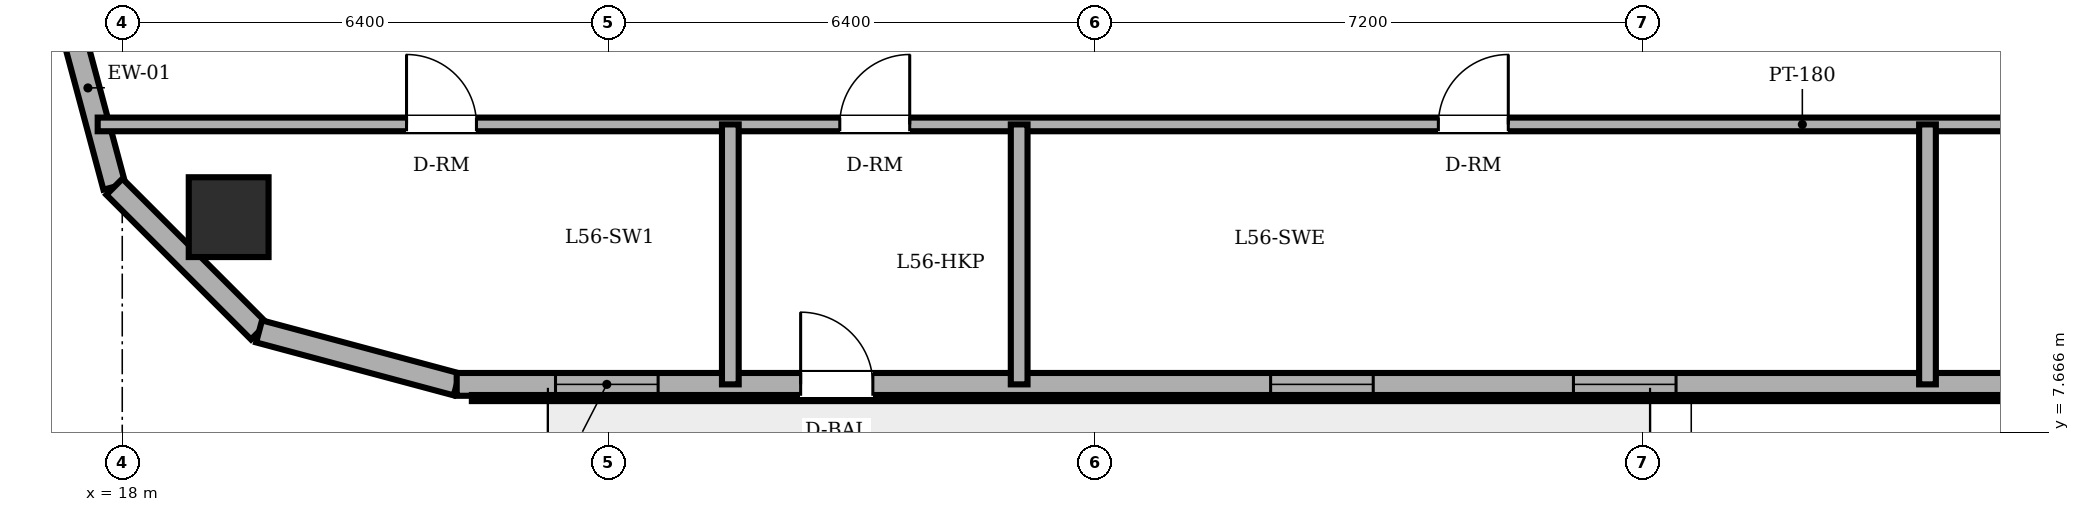
"""IFC4 building model, lengths in metres.
Left out: names, types, materials, properties, quantities, classifications, styles, units other than length and angle.
Written with IfcOpenShell. Run it as: python <this file> out.ifc"""

import sys

from ifc_helpers import new_model, si_unit, direction, frame, frame_2d, origin, origin_2d, place, context, subcontext, project, spatial, rectangle, circle, extrude, element, fill, save


model = new_model("IFC4")
c1 = context("Model", 3, precision=1e-05, world=origin(), true_north=direction((0.0, 1.0)))
c2 = subcontext(c1, "Body", "Model", "MODEL_VIEW")
j1 = project(units=[si_unit("LENGTHUNIT", "METRE"), si_unit("PLANEANGLEUNIT", "RADIAN")], contexts=[c1])
p1 = place(None, origin())
s1 = spatial("IfcSite", under=j1, at=p1, CompositionType="ELEMENT")
p2 = place(p1, origin())
s2 = spatial("IfcBuilding", under=s1, at=p2, CompositionType="ELEMENT")
p3 = place(p2, frame((0.0, 0.0, 215.7)))
s3 = spatial("IfcBuildingStorey", under=s2, at=p3, CompositionType="ELEMENT", Elevation=215.7)
p4 = place(p3, frame((19.4, 10.5, 0.0), z_axis=(0.0, 0.0, 1.0), x_axis=(1.0, 0.0, 0.0)))
e1 = element("IfcColumn", 1, at=p4, inside=s3, PredefinedType="COLUMN", context=c2, shape_type="SweptSolid", body=[
    extrude(circle(Radius=0.525, at=origin_2d()), origin(), (0.0, 0.0, 1.0), 3.6),
])
p5 = place(p3, frame((17.2, 13.5, 0.0), z_axis=(0.0, 0.0, 1.0), x_axis=(0.258932525951, -0.965895412042, 0.0)))
e2 = element("IfcWall", 2, at=p5, inside=s3, PredefinedType="SOLIDWALL", context=c2, shape_type="SweptSolid", body=[
    extrude(rectangle(XDim=2.692, YDim=0.3, at=frame_2d((1.346, 0.0))), origin(), (0.0, 0.0, 1.0), 3.4),
])
p6 = place(p3, frame((17.897, 10.9, 0.0), z_axis=(0.0, 0.0, 1.0), x_axis=(0.707152139074, -0.70706142039, 0.0)))
e3 = element("IfcWall", 3, at=p6, inside=s3, PredefinedType="SOLIDWALL", context=c2, shape_type="SweptSolid", body=[
    extrude(rectangle(XDim=2.691, YDim=0.3, at=frame_2d((1.346, 0.0))), origin(), (0.0, 0.0, 1.0), 3.4),
])
p7 = place(p3, frame((19.8, 8.997, 0.0), z_axis=(0.0, 0.0, 1.0), x_axis=(0.965889330541, -0.258955210695, 0.0)))
e4 = element("IfcWall", 4, at=p7, inside=s3, PredefinedType="SOLIDWALL", context=c2, shape_type="SweptSolid", body=[
    extrude(rectangle(XDim=2.692, YDim=0.3, at=frame_2d((1.346, 0.0))), origin(), (0.0, 0.0, 1.0), 3.4),
])
p8 = place(p3, frame((22.4, 8.3, 0.0), z_axis=(0.0, 0.0, 1.0), x_axis=(1.0, 0.0, 0.0)))
e5 = element("IfcWall", 5, at=p8, inside=s3, PredefinedType="SOLIDWALL", context=c2, shape_type="SweptSolid", body=[
    extrude(rectangle(XDim=32.485, YDim=0.3, at=frame_2d((16.243, 0.0))), origin(), (0.0, 0.0, 1.0), 3.4),
])
p9 = place(p8, frame((4.525, 0.0, 0.0)))
e6 = element("IfcOpeningElement", 6, at=p9, cuts=e5, PredefinedType="OPENING", context=c2, shape_type="SweptSolid", body=[
    extrude(rectangle(XDim=0.95, YDim=2.2, at=frame_2d((0.475, 1.1))), frame((0.0, 0.16, 0.0), z_axis=(0.0, -1.0, 0.0), x_axis=(1.0, 0.0, 0.0)), (0.0, 0.0, 1.0), 0.32),
])
p10 = place(p8, frame((1.3, 0.0, 0.85)))
e7 = element("IfcOpeningElement", 7, at=p10, cuts=e5, PredefinedType="OPENING", context=c2, shape_type="SweptSolid", body=[
    extrude(rectangle(XDim=1.35, YDim=1.55, at=frame_2d((0.675, 0.775))), frame((0.0, 0.16, 0.0), z_axis=(0.0, -1.0, 0.0), x_axis=(1.0, 0.0, 0.0)), (0.0, 0.0, 1.0), 0.32),
])
p11 = place(p8, frame((10.708, 0.0, 0.85)))
e8 = element("IfcOpeningElement", 8, at=p11, cuts=e5, PredefinedType="OPENING", context=c2, shape_type="SweptSolid", body=[
    extrude(rectangle(XDim=1.35, YDim=1.55, at=frame_2d((0.675, 0.775))), frame((0.0, 0.16, 0.0), z_axis=(0.0, -1.0, 0.0), x_axis=(1.0, 0.0, 0.0)), (0.0, 0.0, 1.0), 0.32),
])
p12 = place(p8, frame((14.692, 0.0, 0.85)))
e9 = element("IfcOpeningElement", 9, at=p12, cuts=e5, PredefinedType="OPENING", context=c2, shape_type="SweptSolid", body=[
    extrude(rectangle(XDim=1.35, YDim=1.55, at=frame_2d((0.675, 0.775))), frame((0.0, 0.16, 0.0), z_axis=(0.0, -1.0, 0.0), x_axis=(1.0, 0.0, 0.0)), (0.0, 0.0, 1.0), 0.32),
])
p13 = place(p8, frame((22.937, 0.0, 0.85)))
e10 = element("IfcOpeningElement", 10, at=p13, cuts=e5, PredefinedType="OPENING", context=c2, shape_type="SweptSolid", body=[
    extrude(rectangle(XDim=1.35, YDim=1.55, at=frame_2d((0.675, 0.775))), frame((0.0, 0.16, 0.0), z_axis=(0.0, -1.0, 0.0), x_axis=(1.0, 0.0, 0.0)), (0.0, 0.0, 1.0), 0.32),
])
p14 = place(p8, frame((27.198, 0.0, 0.85)))
e11 = element("IfcOpeningElement", 11, at=p14, cuts=e5, PredefinedType="OPENING", context=c2, shape_type="SweptSolid", body=[
    extrude(rectangle(XDim=1.35, YDim=1.55, at=frame_2d((0.675, 0.775))), frame((0.0, 0.16, 0.0), z_axis=(0.0, -1.0, 0.0), x_axis=(1.0, 0.0, 0.0)), (0.0, 0.0, 1.0), 0.32),
])
p15 = place(p3, frame((17.677, 11.72, 0.0), z_axis=(0.0, 0.0, 1.0), x_axis=(1.0, 0.0, 0.0)))
e12 = element("IfcWall", 12, at=p15, inside=s3, PredefinedType="PARTITIONING", context=c2, shape_type="SweptSolid", body=[
    extrude(rectangle(XDim=44.853, YDim=0.18, at=frame_2d((22.427, 0.0))), origin(), (0.0, 0.0, 1.0), 3.4),
])
p16 = place(p15, frame((9.763, 0.0, 0.0)))
e13 = element("IfcOpeningElement", 13, at=p16, cuts=e12, PredefinedType="OPENING", context=c2, shape_type="SweptSolid", body=[
    extrude(rectangle(XDim=0.92, YDim=2.1, at=frame_2d((0.46, 1.05))), frame((0.0, 0.1, 0.0), z_axis=(0.0, -1.0, 0.0), x_axis=(1.0, 0.0, 0.0)), (0.0, 0.0, 1.0), 0.2),
])
p17 = place(p15, frame((26.113, 0.0, 0.0)))
e14 = element("IfcOpeningElement", 14, at=p17, cuts=e12, PredefinedType="OPENING", context=c2, shape_type="SweptSolid", body=[
    extrude(rectangle(XDim=0.92, YDim=2.1, at=frame_2d((0.46, 1.05))), frame((0.0, 0.1, 0.0), z_axis=(0.0, -1.0, 0.0), x_axis=(1.0, 0.0, 0.0)), (0.0, 0.0, 1.0), 0.2),
])
p18 = place(p15, frame((4.063, 0.0, 0.0)))
e15 = element("IfcOpeningElement", 15, at=p18, cuts=e12, PredefinedType="OPENING", context=c2, shape_type="SweptSolid", body=[
    extrude(rectangle(XDim=0.92, YDim=2.1, at=frame_2d((0.46, 1.05))), frame((0.0, 0.1, 0.0), z_axis=(0.0, -1.0, 0.0), x_axis=(1.0, 0.0, 0.0)), (0.0, 0.0, 1.0), 0.2),
])
p19 = place(p15, frame((17.638, 0.0, 0.0)))
e16 = element("IfcOpeningElement", 16, at=p19, cuts=e12, PredefinedType="OPENING", context=c2, shape_type="SweptSolid", body=[
    extrude(rectangle(XDim=0.92, YDim=2.1, at=frame_2d((0.46, 1.05))), frame((0.0, 0.1, 0.0), z_axis=(0.0, -1.0, 0.0), x_axis=(1.0, 0.0, 0.0)), (0.0, 0.0, 1.0), 0.2),
])
for number, where, z_axis, x_axis in (
    (17, (26.0, 8.3, 0.0), (0.0, 0.0, 1.0), (0.0, 1.0, 0.0)),
    (18, (29.8, 8.3, 0.0), (0.0, 0.0, 1.0), (0.0, 1.0, 0.0)),
    (19, (41.75, 8.3, 0.0), (0.0, 0.0, 1.0), (0.0, 1.0, 0.0)),
):
    element("IfcWall", number, at=place(p3, frame(where, z_axis=z_axis, x_axis=x_axis)), inside=s3, PredefinedType="PARTITIONING", context=c2, shape_type="SweptSolid", body=[
        extrude(rectangle(XDim=3.42, YDim=0.22, at=frame_2d((1.71, 0.0))), origin(), (0.0, 0.0, 1.0), 3.4),
    ])
p20 = place(p9, origin())
e20 = element("IfcDoor", 20, at=p20, inside=s3, OperationType="SINGLE_SWING_LEFT", PredefinedType="DOOR", context=c2, shape_type="SweptSolid", body=[
    extrude(rectangle(XDim=0.95, YDim=2.2, at=frame_2d((0.475, 1.1))), frame((0.0, 0.025, 0.0), z_axis=(0.0, -1.0, 0.0), x_axis=(1.0, 0.0, 0.0)), (0.0, 0.0, 1.0), 0.05),
])
fill(e6, e20)
p21 = place(p10, origin())
e21 = element("IfcWindow", 21, at=p21, inside=s3, PartitioningType="SINGLE_PANEL", PredefinedType="WINDOW", context=c2, shape_type="SweptSolid", body=[
    extrude(rectangle(XDim=1.35, YDim=1.55, at=frame_2d((0.675, 0.775))), frame((0.0, 0.03, 0.0), z_axis=(0.0, -1.0, 0.0), x_axis=(1.0, 0.0, 0.0)), (0.0, 0.0, 1.0), 0.06),
])
fill(e7, e21)
p22 = place(p11, origin())
e22 = element("IfcWindow", 22, at=p22, inside=s3, PartitioningType="SINGLE_PANEL", PredefinedType="WINDOW", context=c2, shape_type="SweptSolid", body=[
    extrude(rectangle(XDim=1.35, YDim=1.55, at=frame_2d((0.675, 0.775))), frame((0.0, 0.03, 0.0), z_axis=(0.0, -1.0, 0.0), x_axis=(1.0, 0.0, 0.0)), (0.0, 0.0, 1.0), 0.06),
])
fill(e8, e22)
p23 = place(p12, origin())
e23 = element("IfcWindow", 23, at=p23, inside=s3, PartitioningType="SINGLE_PANEL", PredefinedType="WINDOW", context=c2, shape_type="SweptSolid", body=[
    extrude(rectangle(XDim=1.35, YDim=1.55, at=frame_2d((0.675, 0.775))), frame((0.0, 0.03, 0.0), z_axis=(0.0, -1.0, 0.0), x_axis=(1.0, 0.0, 0.0)), (0.0, 0.0, 1.0), 0.06),
])
fill(e9, e23)
p24 = place(p16, origin())
e24 = element("IfcDoor", 24, at=p24, inside=s3, OperationType="SINGLE_SWING_RIGHT", PredefinedType="DOOR", context=c2, shape_type="SweptSolid", body=[
    extrude(rectangle(XDim=0.92, YDim=2.1, at=frame_2d((0.46, 1.05))), frame((0.0, 0.025, 0.0), z_axis=(0.0, -1.0, 0.0), x_axis=(1.0, 0.0, 0.0)), (0.0, 0.0, 1.0), 0.05),
])
fill(e13, e24)
p25 = place(p18, origin())
e25 = element("IfcDoor", 25, at=p25, inside=s3, OperationType="SINGLE_SWING_LEFT", PredefinedType="DOOR", context=c2, shape_type="SweptSolid", body=[
    extrude(rectangle(XDim=0.92, YDim=2.1, at=frame_2d((0.46, 1.05))), frame((0.0, 0.025, 0.0), z_axis=(0.0, -1.0, 0.0), x_axis=(1.0, 0.0, 0.0)), (0.0, 0.0, 1.0), 0.05),
])
fill(e15, e25)
p26 = place(p19, origin())
e26 = element("IfcDoor", 26, at=p26, inside=s3, OperationType="SINGLE_SWING_RIGHT", PredefinedType="DOOR", context=c2, shape_type="SweptSolid", body=[
    extrude(rectangle(XDim=0.92, YDim=2.1, at=frame_2d((0.46, 1.05))), frame((0.0, 0.025, 0.0), z_axis=(0.0, -1.0, 0.0), x_axis=(1.0, 0.0, 0.0)), (0.0, 0.0, 1.0), 0.05),
])
fill(e16, e26)
save(model, sys.argv[1])
